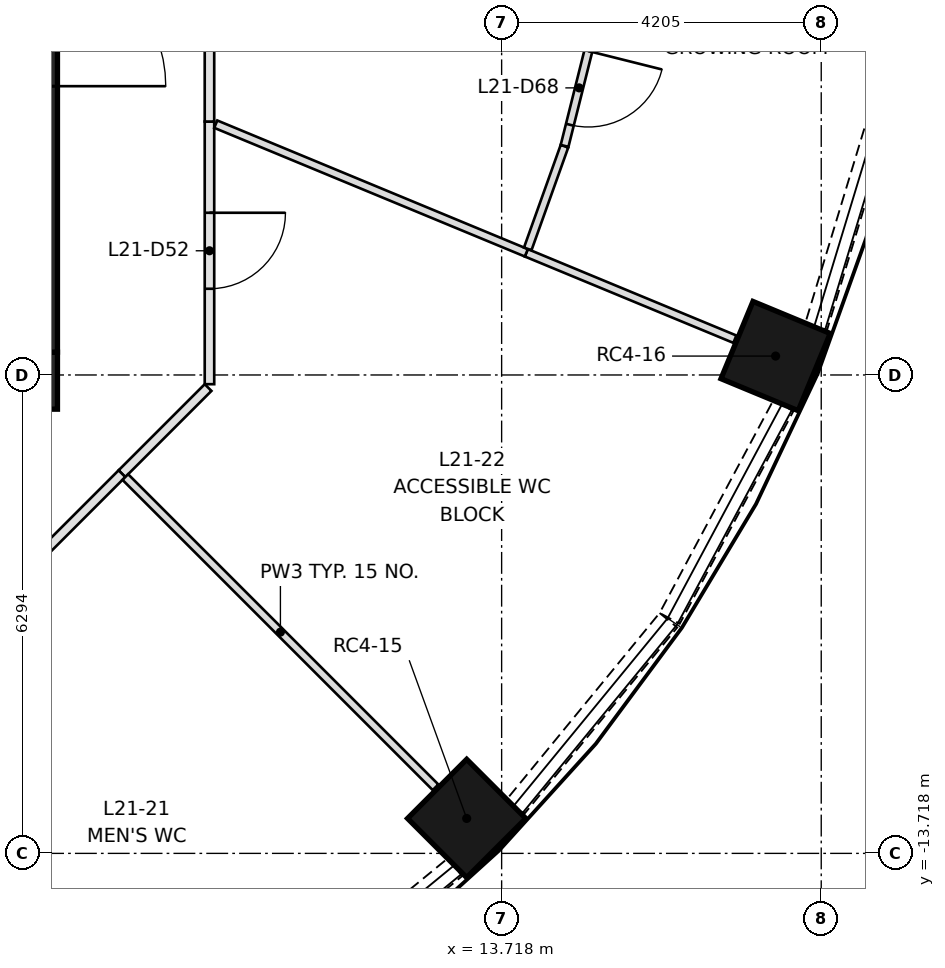
"""IFC4 building model, lengths in metres.
Left out: names, types, materials, properties, quantities, classifications, styles, units other than length and angle.
Written with IfcOpenShell. Run it as: python <this file> out.ifc"""

import sys

from ifc_helpers import new_model, si_unit, direction, frame, frame_2d, origin, origin_2d, place, context, subcontext, project, spatial, rectangle, extrude, element, fill, save


model = new_model("IFC4")
c1 = context("Model", 3, precision=1e-05, world=origin(), true_north=direction((0.0, 1.0)))
c2 = subcontext(c1, "Body", "Model", "MODEL_VIEW")
j1 = project(units=[si_unit("LENGTHUNIT", "METRE"), si_unit("PLANEANGLEUNIT", "RADIAN")], contexts=[c1])
p1 = place(None, origin())
s1 = spatial("IfcSite", under=j1, at=p1, CompositionType="ELEMENT")
p2 = place(p1, origin())
s2 = spatial("IfcBuilding", under=s1, at=p2, CompositionType="ELEMENT")
p3 = place(p2, frame((0.0, 0.0, 83.7)))
s3 = spatial("IfcBuildingStorey", under=s2, at=p3, CompositionType="ELEMENT", Elevation=83.7)
for number, where, z_axis, x_axis in (
    (1, (13.258, -13.258, 0.0), (0.0, 0.0, 1.0), (0.707, -0.707, 0.0)),
    (2, (17.323, -7.175, 0.0), (0.0, 0.0, 1.0), (0.924, -0.383, 0.0)),
):
    element("IfcColumn", number, at=place(p3, frame(where, z_axis=z_axis, x_axis=x_axis)), inside=s3, PredefinedType="COLUMN", context=c2, shape_type="SweptSolid", body=[
        extrude(rectangle(XDim=1.1, YDim=1.1, at=origin_2d()), origin(), (0.0, 0.0, 1.0), 3.65),
    ])
p4 = place(p3, frame((-7.874, -7.499, 0.0), z_axis=(0.0, 0.0, 1.0), x_axis=(1.0, 0.0, 0.0)))
e3 = element("IfcWall", 3, at=p4, inside=s3, PredefinedType="SHEAR", context=c2, shape_type="SweptSolid", body=[
    extrude(rectangle(XDim=15.748, YDim=0.75, at=frame_2d((7.874, 0.0))), origin(), (0.0, 0.0, 1.0), 3.65),
])
p5 = place(p3, frame((7.499, -7.124, 0.0), z_axis=(0.0, 0.0, 1.0), x_axis=(0.0, 1.0, 0.0)))
e4 = element("IfcWall", 4, at=p5, inside=s3, PredefinedType="SHEAR", context=c2, shape_type="SweptSolid", body=[
    extrude(rectangle(XDim=14.248, YDim=0.75, at=frame_2d((7.124, 0.0))), origin(), (0.0, 0.0, 1.0), 3.65),
])
p6 = place(p5, frame((6.624, 0.0, 0.0)))
e5 = element("IfcOpeningElement", 5, at=p6, cuts=e4, PredefinedType="OPENING", context=c2, shape_type="SweptSolid", body=[
    extrude(rectangle(XDim=1.0, YDim=2.1, at=frame_2d((0.5, 1.05))), frame((0.0, 0.385, 0.0), z_axis=(0.0, -1.0, 0.0), x_axis=(1.0, 0.0, 0.0)), (0.0, 0.0, 1.0), 0.77),
])
p7 = place(p5, frame((3.5, 0.0, 0.0)))
e6 = element("IfcOpeningElement", 6, at=p7, cuts=e4, PredefinedType="OPENING", context=c2, shape_type="SweptSolid", body=[
    extrude(rectangle(XDim=1.8, YDim=2.1, at=frame_2d((0.9, 1.05))), frame((0.0, 0.385, 0.0), z_axis=(0.0, -1.0, 0.0), x_axis=(1.0, 0.0, 0.0)), (0.0, 0.0, 1.0), 0.77),
])
p8 = place(p5, frame((8.948, 0.0, 0.0)))
e7 = element("IfcOpeningElement", 7, at=p8, cuts=e4, PredefinedType="OPENING", context=c2, shape_type="SweptSolid", body=[
    extrude(rectangle(XDim=1.8, YDim=2.1, at=frame_2d((0.9, 1.05))), frame((0.0, 0.385, 0.0), z_axis=(0.0, -1.0, 0.0), x_axis=(1.0, 0.0, 0.0)), (0.0, 0.0, 1.0), 0.77),
])
for number, where, z_axis, x_axis in (
    (8, (10.651, -15.913, 0.0), (0.0, 0.0, 1.0), (0.773, 0.634, 0.0)),
    (9, (13.9, -13.104, 0.0), (0.0, 0.0, 1.0), (0.634, 0.773, 0.0)),
):
    element("IfcWall", number, at=place(p3, frame(where, z_axis=z_axis, x_axis=x_axis)), inside=s3, PredefinedType="SOLIDWALL", context=c2, shape_type="SweptSolid", body=[
        extrude(rectangle(XDim=3.173, YDim=0.3, at=frame_2d((1.586, 0.0))), origin(), (0.0, 0.0, 1.0), 0.9),
    ])
p9 = place(p3, frame((15.929, -10.626, 0.0), z_axis=(0.0, 0.0, 1.0), x_axis=(0.471458802606, 0.88188808669, 0.0)))
e10 = element("IfcWall", 10, at=p9, inside=s3, PredefinedType="SOLIDWALL", context=c2, shape_type="SweptSolid", body=[
    extrude(rectangle(XDim=3.172, YDim=0.3, at=frame_2d((1.586, 0.0))), origin(), (0.0, 0.0, 1.0), 0.9),
])
p10 = place(p3, frame((17.856, -6.787, 0.0), z_axis=(0.0, 0.0, 1.0), x_axis=(0.290325591482, 0.956927923582, 0.0)))
e11 = element("IfcWall", 11, at=p10, inside=s3, PredefinedType="SOLIDWALL", context=c2, shape_type="SweptSolid", body=[
    extrude(rectangle(XDim=3.173, YDim=0.3, at=frame_2d((1.586, 0.0))), origin(), (0.0, 0.0, 1.0), 0.9),
])
p11 = place(p3, frame((9.856, -7.589, 0.0), z_axis=(0.0, 0.0, 1.0), x_axis=(-0.70718294931, -0.707030604857, 0.0)))
e12 = element("IfcWall", 12, at=p11, inside=s3, PredefinedType="PARTITIONING", context=c2, shape_type="SweptSolid", body=[
    extrude(rectangle(XDim=1.603, YDim=0.125, at=frame_2d((0.801, 0.0))), origin(), (0.0, 0.0, 1.0), 3.3),
])
p12 = place(p3, frame((9.874, -4.09, 0.0), z_axis=(0.0, 0.0, 1.0), x_axis=(0.0, -1.0, 0.0)))
e13 = element("IfcWall", 13, at=p12, inside=s3, PredefinedType="PARTITIONING", context=c2, shape_type="SweptSolid", body=[
    extrude(rectangle(XDim=3.455, YDim=0.125, at=frame_2d((1.728, 0.0))), origin(), (0.0, 0.0, 1.0), 3.3),
])
p13 = place(p12, frame((1.2, 0.0, 0.0)))
e14 = element("IfcOpeningElement", 14, at=p13, cuts=e13, PredefinedType="OPENING", context=c2, shape_type="SweptSolid", body=[
    extrude(rectangle(XDim=1.0, YDim=2.1, at=frame_2d((0.5, 1.05))), frame((0.0, 0.073, 0.0), z_axis=(0.0, -1.0, 0.0), x_axis=(1.0, 0.0, 0.0)), (0.0, 0.0, 1.0), 0.145),
])
p14 = place(p3, frame((9.874, 0.0, 0.0), z_axis=(0.0, 0.0, 1.0), x_axis=(0.0, -1.0, 0.0)))
e15 = element("IfcWall", 15, at=p14, inside=s3, PredefinedType="PARTITIONING", context=c2, shape_type="SweptSolid", body=[
    extrude(rectangle(XDim=4.09, YDim=0.125, at=frame_2d((2.045, 0.0))), origin(), (0.0, 0.0, 1.0), 3.3),
])
p15 = place(p14, frame((1.5, 0.0, 0.0)))
e16 = element("IfcOpeningElement", 16, at=p15, cuts=e15, PredefinedType="OPENING", context=c2, shape_type="SweptSolid", body=[
    extrude(rectangle(XDim=1.0, YDim=2.1, at=frame_2d((0.5, 1.05))), frame((0.0, 0.073, 0.0), z_axis=(0.0, -1.0, 0.0), x_axis=(1.0, 0.0, 0.0)), (0.0, 0.0, 1.0), 0.145),
])
p16 = place(p3, frame((8.722, -8.722, 0.0), z_axis=(0.0, 0.0, 1.0), x_axis=(-0.707030604857, -0.70718294931, 0.0)))
e17 = element("IfcWall", 17, at=p16, inside=s3, PredefinedType="PARTITIONING", context=c2, shape_type="SweptSolid", body=[
    extrude(rectangle(XDim=1.603, YDim=0.125, at=frame_2d((0.801, 0.0))), origin(), (0.0, 0.0, 1.0), 3.3),
])
p17 = place(p3, frame((8.767, -8.767, 0.0), z_axis=(0.0, 0.0, 1.0), x_axis=(0.707106781187, -0.707106781187, 0.0)))
e18 = element("IfcWall", 18, at=p17, inside=s3, PredefinedType="PARTITIONING", context=c2, shape_type="SweptSolid", body=[
    extrude(rectangle(XDim=5.772, YDim=0.105, at=frame_2d((2.886, 0.0))), origin(), (0.0, 0.0, 1.0), 3.3),
])
p18 = place(p3, frame((14.043, -5.817, 0.0), z_axis=(0.0, 0.0, 1.0), x_axis=(0.923889594764, -0.382659139036, 0.0)))
e19 = element("IfcWall", 19, at=p18, inside=s3, PredefinedType="PARTITIONING", context=c2, shape_type="SweptSolid", body=[
    extrude(rectangle(XDim=2.97, YDim=0.105, at=frame_2d((1.485, 0.0))), origin(), (0.0, 0.0, 1.0), 3.3),
])
p19 = place(p3, frame((9.957, -4.124, 0.0), z_axis=(0.0, 0.0, 1.0), x_axis=(0.923862097388, -0.382725521764, 0.0)))
e20 = element("IfcWall", 20, at=p19, inside=s3, PredefinedType="PARTITIONING", context=c2, shape_type="SweptSolid", body=[
    extrude(rectangle(XDim=4.423, YDim=0.105, at=frame_2d((2.211, 0.0))), origin(), (0.0, 0.0, 1.0), 3.3),
])
p20 = place(p3, frame((14.062, -5.765, 0.0), z_axis=(0.0, 0.0, 1.0), x_axis=(0.336940319535, 0.941526006583, 0.0)))
e21 = element("IfcWall", 21, at=p20, inside=s3, PredefinedType="PARTITIONING", context=c2, shape_type="SweptSolid", body=[
    extrude(rectangle(XDim=1.434, YDim=0.105, at=frame_2d((0.717, 0.0))), origin(), (0.0, 0.0, 1.0), 3.3),
])
p21 = place(p3, frame((14.907, -2.968, 0.0), z_axis=(0.0, 0.0, 1.0), x_axis=(-0.242922070527, -0.970045806986, 0.0)))
e22 = element("IfcWall", 22, at=p21, inside=s3, PredefinedType="PARTITIONING", context=c2, shape_type="SweptSolid", body=[
    extrude(rectangle(XDim=1.486, YDim=0.105, at=frame_2d((0.743, 0.0))), origin(), (0.0, 0.0, 1.0), 3.3),
])
p22 = place(p21, frame((0.2, 0.0, 0.0)))
e23 = element("IfcOpeningElement", 23, at=p22, cuts=e22, PredefinedType="OPENING", context=c2, shape_type="SweptSolid", body=[
    extrude(rectangle(XDim=1.0, YDim=2.1, at=frame_2d((0.5, 1.05))), frame((0.0, 0.062, 0.0), z_axis=(0.0, -1.0, 0.0), x_axis=(1.0, 0.0, 0.0)), (0.0, 0.0, 1.0), 0.125),
])
p23 = place(p13, origin())
e24 = element("IfcDoor", 24, at=p23, inside=s3, OperationType="SINGLE_SWING_LEFT", PredefinedType="DOOR", context=c2, shape_type="SweptSolid", body=[
    extrude(rectangle(XDim=1.0, YDim=2.1, at=frame_2d((0.5, 1.05))), frame((0.0, 0.025, 0.0), z_axis=(0.0, -1.0, 0.0), x_axis=(1.0, 0.0, 0.0)), (0.0, 0.0, 1.0), 0.05),
])
fill(e14, e24)
p24 = place(p22, origin())
e25 = element("IfcDoor", 25, at=p24, inside=s3, OperationType="SINGLE_SWING_LEFT", PredefinedType="DOOR", context=c2, shape_type="SweptSolid", body=[
    extrude(rectangle(XDim=1.0, YDim=2.1, at=frame_2d((0.5, 1.05))), frame((0.0, 0.025, 0.0), z_axis=(0.0, -1.0, 0.0), x_axis=(1.0, 0.0, 0.0)), (0.0, 0.0, 1.0), 0.05),
])
fill(e23, e25)
save(model, sys.argv[1])
